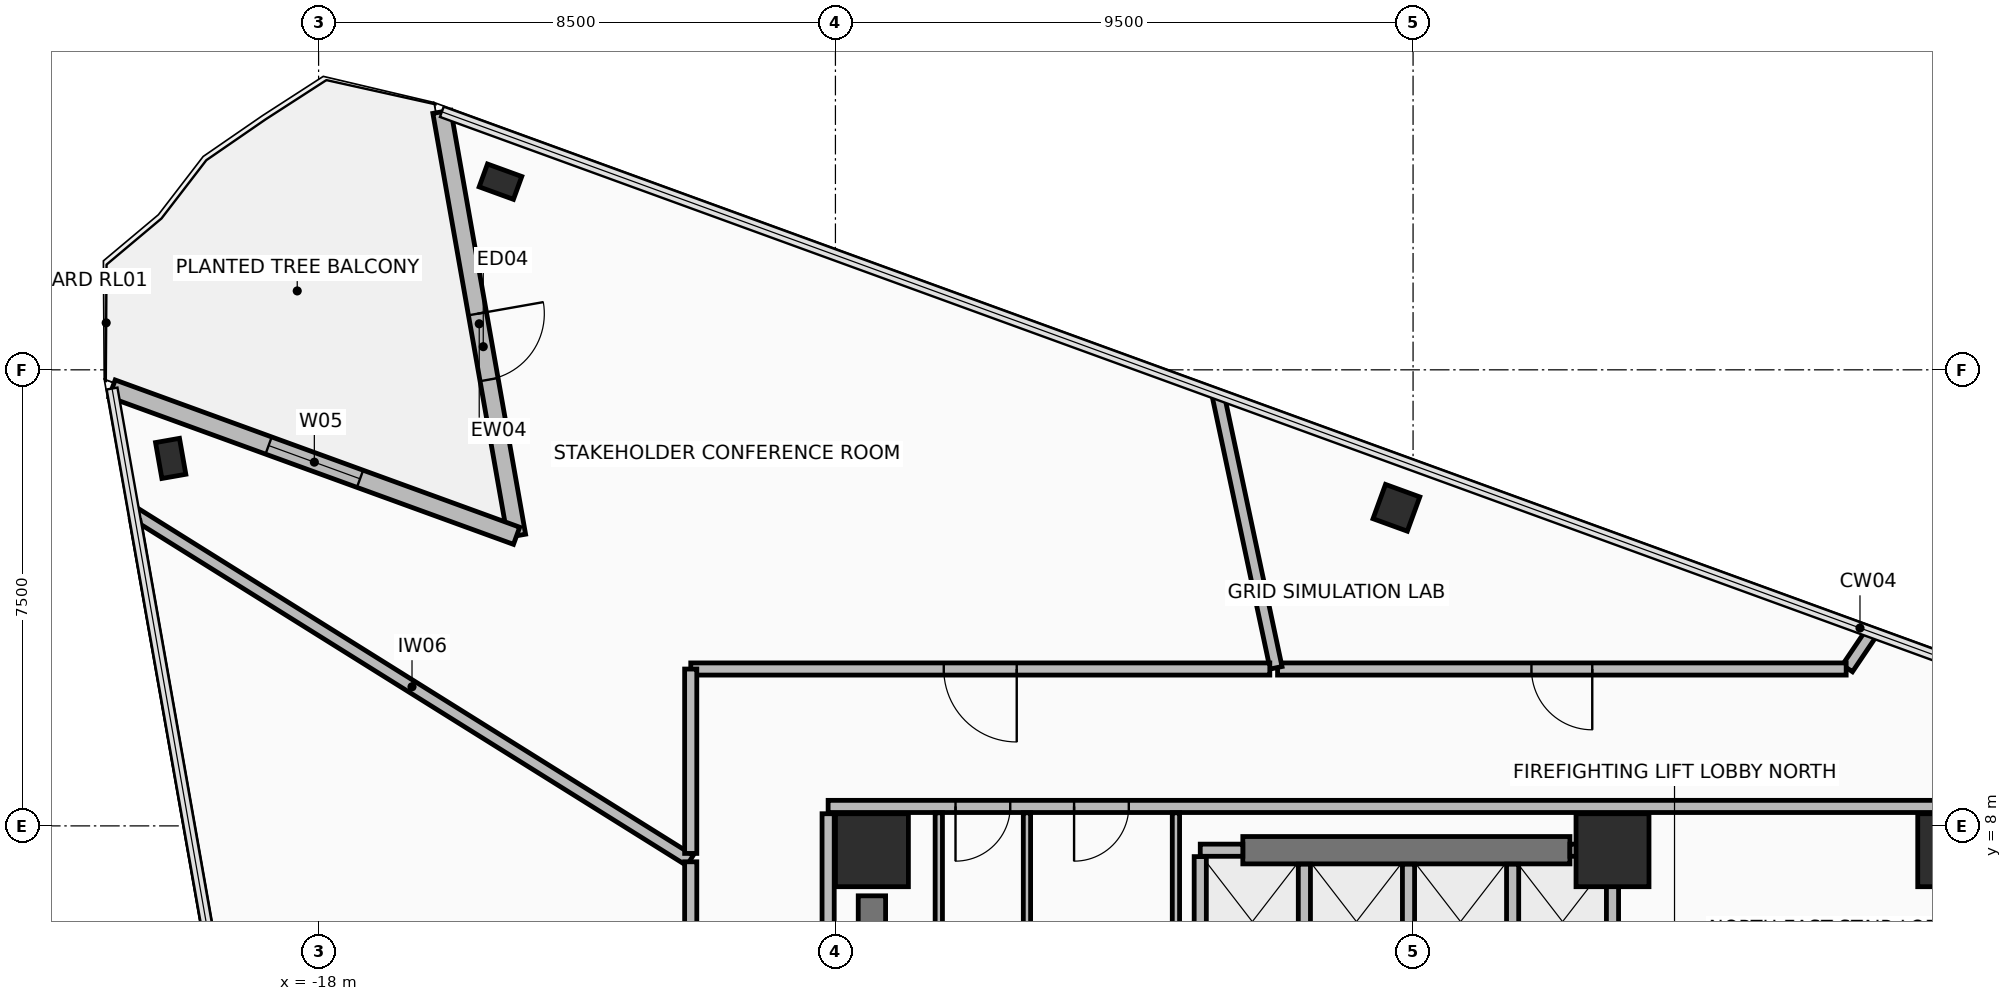
"""IFC4 building model, lengths in metres.
Left out: names, types, materials, properties, quantities, classifications, styles, units other than length and angle.
Written with IfcOpenShell. Run it as: python <this file> out.ifc"""

import sys

from ifc_helpers import new_model, si_unit, direction, frame, frame_2d, origin, origin_2d, place, context, subcontext, project, spatial, rectangle, hollow_rectangle, extrude, element, fill, save


model = new_model("IFC4")
c1 = context("Model", 3, precision=1e-05, world=origin(), true_north=direction((0.0, 1.0)))
c2 = subcontext(c1, "Body", "Model", "MODEL_VIEW")
j1 = project(units=[si_unit("LENGTHUNIT", "METRE"), si_unit("PLANEANGLEUNIT", "RADIAN")], contexts=[c1])
p1 = place(None, origin())
s1 = spatial("IfcSite", under=j1, at=p1, CompositionType="ELEMENT")
p2 = place(p1, origin())
s2 = spatial("IfcBuilding", under=s1, at=p2, CompositionType="ELEMENT")
p3 = place(p2, frame((0.0, 0.0, 174.1)))
s3 = spatial("IfcBuildingStorey", under=s2, at=p3, CompositionType="ELEMENT", Elevation=174.1)
for number, where, z_axis, x_axis in (
    (1, (8.9, 7.6, 0.0), (0.0, 0.0, 1.0), (1.0, 0.0, 0.0)),
    (2, (3.28, 7.6, 0.0), (0.0, 0.0, 1.0), (1.0, 0.0, 0.0)),
    (3, (-8.9, 7.6, 0.0), (0.0, 0.0, 1.0), (1.0, 0.0, 0.0)),
):
    element("IfcColumn", number, at=place(p3, frame(where, z_axis=z_axis, x_axis=x_axis)), inside=s3, PredefinedType="COLUMN", context=c2, shape_type="SweptSolid", body=[
        extrude(rectangle(XDim=1.2, YDim=1.2, at=origin_2d()), origin(), (0.0, 0.0, 1.0), 3.6),
    ])
p4 = place(p3, frame((-20.433, 14.043, 0.0), z_axis=(0.0, 0.0, 1.0), x_axis=(-0.173648177667, 0.984807753012, 0.0)))
e4 = element("IfcColumn", 4, at=p4, inside=s3, PredefinedType="COLUMN", context=c2, shape_type="SweptSolid", body=[
    extrude(hollow_rectangle(XDim=0.4, YDim=0.6, WallThickness=0.03, at=origin_2d()), origin(), (0.0, 0.0, 1.0), 3.6),
])
p5 = place(p3, frame((-0.274, 13.231, 0.0), z_axis=(0.0, 0.0, 1.0), x_axis=(-0.939692023847, 0.342021783398, 0.0)))
e5 = element("IfcColumn", 5, at=p5, inside=s3, PredefinedType="COLUMN", context=c2, shape_type="SweptSolid", body=[
    extrude(hollow_rectangle(XDim=0.6, YDim=0.6, WallThickness=0.036, at=origin_2d()), origin(), (0.0, 0.0, 1.0), 3.6),
])
p6 = place(p3, frame((-15.009, 18.594, 0.0), z_axis=(0.0, 0.0, 1.0), x_axis=(-0.939692023847, 0.342021783398, 0.0)))
e6 = element("IfcColumn", 6, at=p6, inside=s3, PredefinedType="COLUMN", context=c2, shape_type="SweptSolid", body=[
    extrude(hollow_rectangle(XDim=0.4, YDim=0.6, WallThickness=0.03, at=origin_2d()), origin(), (0.0, 0.0, 1.0), 3.6),
])
p7 = place(p3, frame((-15.973, 19.743, 0.0), z_axis=(0.0, 0.0, 1.0), x_axis=(0.173651569749, -0.984807154891, 0.0)))
e7 = element("IfcWall", 7, at=p7, inside=s3, PredefinedType="STANDARD", context=c2, shape_type="SweptSolid", body=[
    extrude(rectangle(XDim=7.08, YDim=0.3, at=frame_2d((3.54, 0.0))), origin(), (0.0, 0.0, 1.0), 2.715),
])
p8 = place(p7, frame((3.372, 0.0, 0.0)))
e8 = element("IfcOpeningElement", 8, at=p8, cuts=e7, PredefinedType="OPENING", context=c2, shape_type="SweptSolid", body=[
    extrude(rectangle(XDim=1.1, YDim=2.2, at=frame_2d((0.55, 1.1))), frame((0.0, 0.16, 0.0), z_axis=(0.0, -1.0, 0.0), x_axis=(1.0, 0.0, 0.0)), (0.0, 0.0, 1.0), 0.32),
])
p9 = place(p3, frame((-14.744, 12.771, 0.0), z_axis=(0.0, 0.0, 1.0), x_axis=(-0.939687665182, 0.342033758429, 0.0)))
e9 = element("IfcWall", 9, at=p9, inside=s3, PredefinedType="STANDARD", context=c2, shape_type="SweptSolid", body=[
    extrude(rectangle(XDim=7.08, YDim=0.3, at=frame_2d((3.54, 0.0))), origin(), (0.0, 0.0, 1.0), 2.715),
])
p10 = place(p9, frame((2.74, 0.0, 0.335)))
e10 = element("IfcOpeningElement", 10, at=p10, cuts=e9, PredefinedType="OPENING", context=c2, shape_type="SweptSolid", body=[
    extrude(rectangle(XDim=1.6, YDim=2.2, at=frame_2d((0.8, 1.1))), frame((0.0, 0.16, 0.0), z_axis=(0.0, -1.0, 0.0), x_axis=(1.0, 0.0, 0.0)), (0.0, 0.0, 1.0), 0.32),
])
p11 = place(p3, frame((-2.8, 7.6, 0.0), z_axis=(0.0, 0.0, 1.0), x_axis=(1.0, 0.0, 0.0)))
e11 = element("IfcWall", 11, at=p11, inside=s3, PredefinedType="SHEAR", context=c2, shape_type="SweptSolid", body=[
    extrude(rectangle(XDim=5.38, YDim=0.45, at=frame_2d((2.69, 0.0))), origin(), (0.0, 0.0, 1.0), 3.42),
])
p12 = place(p3, frame((-8.9, -3.85, 0.0), z_axis=(0.0, 0.0, 1.0), x_axis=(0.0, 1.0, 0.0)))
e12 = element("IfcWall", 12, at=p12, inside=s3, PredefinedType="SHEAR", context=c2, shape_type="SweptSolid", body=[
    extrude(rectangle(XDim=10.7, YDim=0.45, at=frame_2d((5.35, 0.0))), origin(), (0.0, 0.0, 1.0), 3.42),
])
p13 = place(p3, frame((9.62, 8.32, 0.0), z_axis=(0.0, 0.0, 1.0), x_axis=(-1.0, 0.0, 0.0)))
e13 = element("IfcWall", 13, at=p13, inside=s3, PredefinedType="PARTITIONING", context=c2, shape_type="SweptSolid", body=[
    extrude(rectangle(XDim=19.24, YDim=0.2, at=frame_2d((9.62, 0.0))), origin(), (0.0, 0.0, 1.0), 2.765),
])
p14 = place(p13, frame((16.245, 0.0, 0.0)))
e14 = element("IfcOpeningElement", 14, at=p14, cuts=e13, PredefinedType="OPENING", context=c2, shape_type="SweptSolid", body=[
    extrude(rectangle(XDim=0.9, YDim=2.1, at=frame_2d((0.45, 1.05))), frame((0.0, 0.11, 0.0), z_axis=(0.0, -1.0, 0.0), x_axis=(1.0, 0.0, 0.0)), (0.0, 0.0, 1.0), 0.22),
])
p15 = place(p13, frame((14.295, 0.0, 0.0)))
e15 = element("IfcOpeningElement", 15, at=p15, cuts=e13, PredefinedType="OPENING", context=c2, shape_type="SweptSolid", body=[
    extrude(rectangle(XDim=0.9, YDim=2.1, at=frame_2d((0.45, 1.05))), frame((0.0, 0.11, 0.0), z_axis=(0.0, -1.0, 0.0), x_axis=(1.0, 0.0, 0.0)), (0.0, 0.0, 1.0), 0.22),
])
p16 = place(p3, frame((-9.62, 8.2, 0.0), z_axis=(0.0, 0.0, 1.0), x_axis=(0.0, -1.0, 0.0)))
e16 = element("IfcWall", 16, at=p16, inside=s3, PredefinedType="PARTITIONING", context=c2, shape_type="SweptSolid", body=[
    extrude(rectangle(XDim=16.4, YDim=0.2, at=frame_2d((8.2, 0.0))), origin(), (0.0, 0.0, 1.0), 2.765),
])
p17 = place(p16, frame((12.65, 0.0, 0.0)))
e17 = element("IfcOpeningElement", 17, at=p17, cuts=e16, PredefinedType="OPENING", context=c2, shape_type="SweptSolid", body=[
    extrude(rectangle(XDim=1.1, YDim=2.15, at=frame_2d((0.55, 1.075))), frame((0.0, 0.11, 0.0), z_axis=(0.0, -1.0, 0.0), x_axis=(1.0, 0.0, 0.0)), (0.0, 0.0, 1.0), 0.22),
])
p18 = place(p3, frame((-3.5, 7.6, 0.0), z_axis=(0.0, 0.0, 1.0), x_axis=(1.0, 0.0, 0.0)))
e18 = element("IfcWall", 18, at=p18, inside=s3, PredefinedType="PARTITIONING", context=c2, shape_type="SweptSolid", body=[
    extrude(rectangle(XDim=0.7, YDim=0.2, at=frame_2d((0.35, 0.0))), origin(), (0.0, 0.0, 1.0), 2.715),
])
p19 = place(p3, frame((-3.5, 5.38, 0.0), z_axis=(0.0, 0.0, 1.0), x_axis=(0.0, 1.0, 0.0)))
e19 = element("IfcWall", 19, at=p19, inside=s3, PredefinedType="PARTITIONING", context=c2, shape_type="SweptSolid", body=[
    extrude(rectangle(XDim=2.115, YDim=0.2, at=frame_2d((1.058, 0.0))), origin(), (0.0, 0.0, 1.0), 2.715),
])
for number, where, z_axis, x_axis in (
    (20, (-1.788, 5.38, 0.0), (0.0, 0.0, 1.0), (0.0, 1.0, 0.0)),
    (21, (-0.075, 5.38, 0.0), (0.0, 0.0, 1.0), (0.0, 1.0, 0.0)),
    (22, (1.637, 5.38, 0.0), (0.0, 0.0, 1.0), (0.0, 1.0, 0.0)),
):
    element("IfcWall", number, at=place(p3, frame(where, z_axis=z_axis, x_axis=x_axis)), inside=s3, PredefinedType="PARTITIONING", context=c2, shape_type="SweptSolid", body=[
        extrude(rectangle(XDim=1.99, YDim=0.2, at=frame_2d((0.995, 0.0))), origin(), (0.0, 0.0, 1.0), 2.715),
    ])
p20 = place(p3, frame((2.58, 7.6, 0.0), z_axis=(0.0, 0.0, 1.0), x_axis=(1.0, 0.0, 0.0)))
e23 = element("IfcWall", 23, at=p20, inside=s3, PredefinedType="PARTITIONING", context=c2, shape_type="SweptSolid", body=[
    extrude(rectangle(XDim=0.7, YDim=0.2, at=frame_2d((0.35, 0.0))), origin(), (0.0, 0.0, 1.0), 2.715),
])
p21 = place(p3, frame((3.28, 5.38, 0.0), z_axis=(0.0, 0.0, 1.0), x_axis=(0.0, 1.0, 0.0)))
e24 = element("IfcWall", 24, at=p21, inside=s3, PredefinedType="PARTITIONING", context=c2, shape_type="SweptSolid", body=[
    extrude(rectangle(XDim=2.115, YDim=0.2, at=frame_2d((1.058, 0.0))), origin(), (0.0, 0.0, 1.0), 2.715),
])
for number, where, z_axis, x_axis in (
    (25, (-6.35, 4.265, 0.0), (0.0, 0.0, 1.0), (0.0, 1.0, 0.0)),
    (26, (-7.8, 8.215, 0.0), (0.0, 0.0, 1.0), (0.0, -1.0, 0.0)),
    (27, (-3.9, 4.265, 0.0), (0.0, 0.0, 1.0), (0.0, 1.0, 0.0)),
):
    element("IfcWall", number, at=place(p3, frame(where, z_axis=z_axis, x_axis=x_axis)), inside=s3, PredefinedType="PARTITIONING", context=c2, shape_type="SweptSolid", body=[
        extrude(rectangle(XDim=3.95, YDim=0.12, at=frame_2d((1.975, 0.0))), origin(), (0.0, 0.0, 1.0), 2.715),
    ])
p22 = place(p3, frame((-21.036, 13.145, 0.0), z_axis=(0.0, 0.0, 1.0), x_axis=(0.848050455258, -0.529915488863, 0.0)))
e28 = element("IfcWall", 28, at=p22, inside=s3, PredefinedType="PARTITIONING", context=c2, shape_type="SweptSolid", body=[
    extrude(rectangle(XDim=10.782, YDim=0.2, at=frame_2d((5.391, 0.0))), origin(), (0.0, 0.0, 1.0), 2.715),
])
p23 = place(p3, frame((-11.88, 7.41, 0.0), z_axis=(0.0, 0.0, 1.0), x_axis=(0.0, -1.0, 0.0)))
e29 = element("IfcWall", 29, at=p23, inside=s3, PredefinedType="PARTITIONING", context=c2, shape_type="SweptSolid", body=[
    extrude(rectangle(XDim=10.352, YDim=0.2, at=frame_2d((5.176, 0.0))), origin(), (0.0, 0.0, 1.0), 3.42),
])
p24 = place(p23, frame((4.751, 0.0, 0.0)))
e30 = element("IfcOpeningElement", 30, at=p24, cuts=e29, PredefinedType="OPENING", context=c2, shape_type="SweptSolid", body=[
    extrude(rectangle(XDim=0.85, YDim=2.1, at=frame_2d((0.425, 1.05))), frame((0.0, 0.11, 0.0), z_axis=(0.0, -1.0, 0.0), x_axis=(1.0, 0.0, 0.0)), (0.0, 0.0, 1.0), 0.22),
])
p25 = place(p3, frame((-17.934, -4.444, 0.0), z_axis=(0.0, 0.0, 1.0), x_axis=(-0.173637559084, 0.984809625296, 0.0)))
e31 = element("IfcWall", 31, at=p25, inside=s3, PredefinedType="PARTITIONING", context=c2, shape_type="SweptSolid", body=[
    extrude(rectangle(XDim=17.719, YDim=0.15, at=frame_2d((8.859, 0.0))), origin(), (0.0, 0.0, 1.0), 3.42),
])
p26 = place(p3, frame((7.544, 11.184, 0.0), z_axis=(0.0, 0.0, 1.0), x_axis=(-0.559261733949, -0.828991141654, 0.0)))
e32 = element("IfcWall", 32, at=p26, inside=s3, PredefinedType="PARTITIONING", context=c2, shape_type="SweptSolid", body=[
    extrude(rectangle(XDim=0.715, YDim=0.2, at=frame_2d((0.357, 0.0))), origin(), (0.0, 0.0, 1.0), 2.715),
])
p27 = place(p3, frame((7.123, 10.58, 0.0), z_axis=(0.0, 0.0, 1.0), x_axis=(-1.0, 0.0, 0.0)))
e33 = element("IfcWall", 33, at=p27, inside=s3, PredefinedType="PARTITIONING", context=c2, shape_type="SweptSolid", body=[
    extrude(rectangle(XDim=9.352, YDim=0.2, at=frame_2d((4.676, 0.0))), origin(), (0.0, 0.0, 1.0), 2.715),
])
p28 = place(p27, frame((4.176, 0.0, 0.0)))
e34 = element("IfcOpeningElement", 34, at=p28, cuts=e33, PredefinedType="OPENING", context=c2, shape_type="SweptSolid", body=[
    extrude(rectangle(XDim=1.0, YDim=2.15, at=frame_2d((0.5, 1.075))), frame((0.0, 0.11, 0.0), z_axis=(0.0, -1.0, 0.0), x_axis=(1.0, 0.0, 0.0)), (0.0, 0.0, 1.0), 0.22),
])
p29 = place(p3, frame((-2.253, 10.6, 0.0), z_axis=(0.0, 0.0, 1.0), x_axis=(-0.207864470863, 0.978157636454, 0.0)))
e35 = element("IfcWall", 35, at=p29, inside=s3, PredefinedType="PARTITIONING", context=c2, shape_type="SweptSolid", body=[
    extrude(rectangle(XDim=4.598, YDim=0.2, at=frame_2d((2.299, 0.0))), origin(), (0.0, 0.0, 1.0), 2.715),
])
p30 = place(p3, frame((-2.356, 10.58, 0.0), z_axis=(0.0, 0.0, 1.0), x_axis=(-1.0, 0.0, 0.0)))
e36 = element("IfcWall", 36, at=p30, inside=s3, PredefinedType="PARTITIONING", context=c2, shape_type="SweptSolid", body=[
    extrude(rectangle(XDim=9.523, YDim=0.2, at=frame_2d((4.762, 0.0))), origin(), (0.0, 0.0, 1.0), 2.765),
])
p31 = place(p30, frame((4.162, 0.0, 0.0)))
e37 = element("IfcOpeningElement", 37, at=p31, cuts=e36, PredefinedType="OPENING", context=c2, shape_type="SweptSolid", body=[
    extrude(rectangle(XDim=1.2, YDim=2.15, at=frame_2d((0.6, 1.075))), frame((0.0, 0.11, 0.0), z_axis=(0.0, -1.0, 0.0), x_axis=(1.0, 0.0, 0.0)), (0.0, 0.0, 1.0), 0.22),
])
p32 = place(p3, frame((-11.88, 10.579, 0.0), z_axis=(0.0, 0.0, 1.0), x_axis=(0.0, -1.0, 0.0)))
e38 = element("IfcWall", 38, at=p32, inside=s3, PredefinedType="PARTITIONING", context=c2, shape_type="SweptSolid", body=[
    extrude(rectangle(XDim=3.032, YDim=0.2, at=frame_2d((1.516, 0.0))), origin(), (0.0, 0.0, 1.0), 2.765),
])
p33 = place(p8, origin())
e39 = element("IfcDoor", 39, at=p33, inside=s3, OperationType="SINGLE_SWING_LEFT", PredefinedType="DOOR", context=c2, shape_type="SweptSolid", body=[
    extrude(rectangle(XDim=1.1, YDim=2.2, at=frame_2d((0.55, 1.1))), frame((0.0, 0.025, 0.0), z_axis=(0.0, -1.0, 0.0), x_axis=(1.0, 0.0, 0.0)), (0.0, 0.0, 1.0), 0.05),
])
fill(e8, e39)
p34 = place(p10, origin())
e40 = element("IfcWindow", 40, at=p34, inside=s3, PartitioningType="SINGLE_PANEL", PredefinedType="WINDOW", context=c2, shape_type="SweptSolid", body=[
    extrude(rectangle(XDim=1.6, YDim=2.2, at=frame_2d((0.8, 1.1))), frame((0.0, 0.03, 0.0), z_axis=(0.0, -1.0, 0.0), x_axis=(1.0, 0.0, 0.0)), (0.0, 0.0, 1.0), 0.06),
])
fill(e10, e40)
p35 = place(p14, frame((0.9, 0.0, 0.0), z_axis=(0.0, 0.0, 1.0), x_axis=(-1.0, 0.0, 0.0)))
e41 = element("IfcDoor", 41, at=p35, inside=s3, OperationType="SINGLE_SWING_LEFT", PredefinedType="DOOR", context=c2, shape_type="SweptSolid", body=[
    extrude(rectangle(XDim=0.9, YDim=2.1, at=frame_2d((0.45, 1.05))), frame((0.0, 0.025, 0.0), z_axis=(0.0, -1.0, 0.0), x_axis=(1.0, 0.0, 0.0)), (0.0, 0.0, 1.0), 0.05),
])
fill(e14, e41)
p36 = place(p15, frame((0.9, 0.0, 0.0), z_axis=(0.0, 0.0, 1.0), x_axis=(-1.0, 0.0, 0.0)))
e42 = element("IfcDoor", 42, at=p36, inside=s3, OperationType="SINGLE_SWING_LEFT", PredefinedType="DOOR", context=c2, shape_type="SweptSolid", body=[
    extrude(rectangle(XDim=0.9, YDim=2.1, at=frame_2d((0.45, 1.05))), frame((0.0, 0.025, 0.0), z_axis=(0.0, -1.0, 0.0), x_axis=(1.0, 0.0, 0.0)), (0.0, 0.0, 1.0), 0.05),
])
fill(e15, e42)
p37 = place(p28, origin())
e43 = element("IfcDoor", 43, at=p37, inside=s3, OperationType="SINGLE_SWING_RIGHT", PredefinedType="DOOR", context=c2, shape_type="SweptSolid", body=[
    extrude(rectangle(XDim=1.0, YDim=2.15, at=frame_2d((0.5, 1.075))), frame((0.0, 0.025, 0.0), z_axis=(0.0, -1.0, 0.0), x_axis=(1.0, 0.0, 0.0)), (0.0, 0.0, 1.0), 0.05),
])
fill(e34, e43)
p38 = place(p31, origin())
e44 = element("IfcDoor", 44, at=p38, inside=s3, OperationType="SINGLE_SWING_LEFT", PredefinedType="DOOR", context=c2, shape_type="SweptSolid", body=[
    extrude(rectangle(XDim=1.2, YDim=2.15, at=frame_2d((0.6, 1.075))), frame((0.0, 0.025, 0.0), z_axis=(0.0, -1.0, 0.0), x_axis=(1.0, 0.0, 0.0)), (0.0, 0.0, 1.0), 0.05),
])
fill(e37, e44)
save(model, sys.argv[1])
